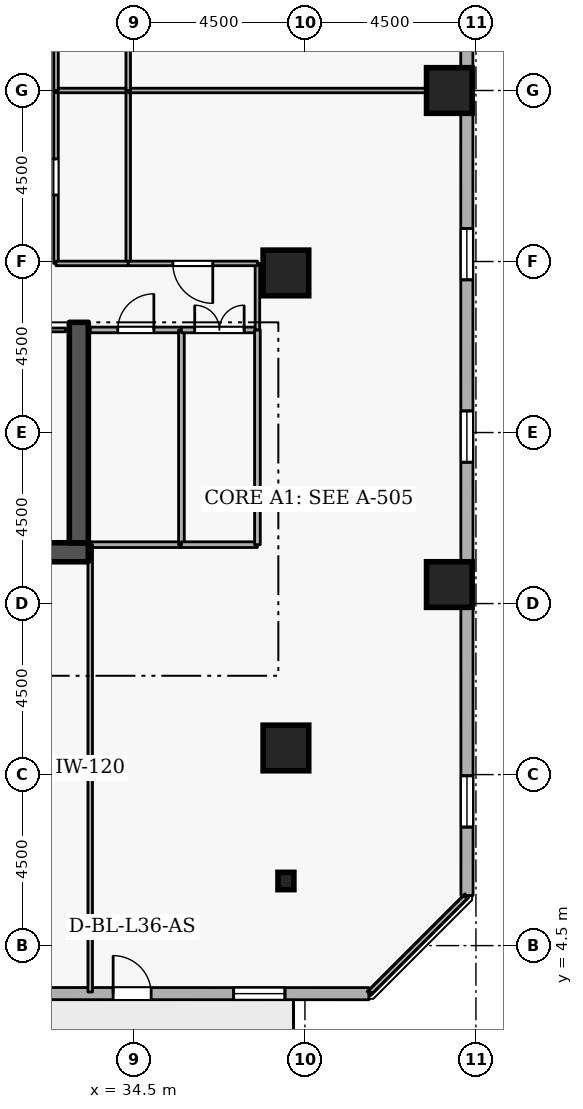
"""IFC4 building model, lengths in metres.
Left out: names, types, materials, properties, quantities, classifications, styles, units other than length and angle.
Written with IfcOpenShell. Run it as: python <this file> out.ifc"""

import sys

from ifc_helpers import new_model, si_unit, direction, frame, frame_2d, origin, origin_2d, place, context, subcontext, project, spatial, rectangle, i_section, extrude, element, fill, save


model = new_model("IFC4")
c1 = context("Model", 3, precision=1e-05, world=origin(), true_north=direction((0.0, 1.0)))
c2 = subcontext(c1, "Body", "Model", "MODEL_VIEW")
j1 = project(units=[si_unit("LENGTHUNIT", "METRE"), si_unit("PLANEANGLEUNIT", "RADIAN")], contexts=[c1])
p1 = place(None, origin())
s1 = spatial("IfcSite", under=j1, at=p1, CompositionType="ELEMENT")
p2 = place(p1, origin())
s2 = spatial("IfcBuilding", under=s1, at=p2, CompositionType="ELEMENT")
p3 = place(p2, frame((0.0, 0.0, 137.7)))
s3 = spatial("IfcBuildingStorey", under=s2, at=p3, CompositionType="ELEMENT", Elevation=137.7)
p4 = place(p3, frame((17.7, 14.85, 0.0), z_axis=(0.0, 0.0, 1.0), x_axis=(1.0, 0.0, 0.0)))
e1 = element("IfcWall", 1, at=p4, inside=s3, PredefinedType="SHEAR", context=c2, shape_type="SweptSolid", body=[
    extrude(rectangle(XDim=15.6, YDim=0.5, at=frame_2d((7.8, 0.0))), origin(), (0.0, 0.0, 1.0), 3.6),
])
p5 = place(p3, frame((33.05, 15.1, 0.0), z_axis=(0.0, 0.0, 1.0), x_axis=(0.0, 1.0, 0.0)))
e2 = element("IfcWall", 2, at=p5, inside=s3, PredefinedType="SHEAR", context=c2, shape_type="SweptSolid", body=[
    extrude(rectangle(XDim=5.8, YDim=0.5, at=frame_2d((2.9, 0.0))), origin(), (0.0, 0.0, 1.0), 3.6),
])
for number, where, z_axis, x_axis in (
    (3, (38.5, 9.7, 0.0), (0.0, 0.0, 1.0), (1.0, 0.0, 0.0)),
    (4, (42.8, 14.0, 0.0), (0.0, 0.0, 1.0), (1.0, 0.0, 0.0)),
    (5, (42.8, 27.0, 0.0), (0.0, 0.0, 1.0), (1.0, 0.0, 0.0)),
    (6, (38.5, 22.2, 0.0), (0.0, 0.0, 1.0), (1.0, 0.0, 0.0)),
):
    element("IfcColumn", number, at=place(p3, frame(where, z_axis=z_axis, x_axis=x_axis)), inside=s3, PredefinedType="COLUMN", context=c2, shape_type="SweptSolid", body=[
        extrude(rectangle(XDim=1.2, YDim=1.2, at=origin_2d()), origin(), (0.0, 0.0, 1.0), 3.6),
    ])
p6 = place(p3, frame((38.5, 6.2, 0.0), z_axis=(0.0, 0.0, 1.0), x_axis=(1.0, 0.0, 0.0)))
e7 = element("IfcColumn", 7, at=p6, inside=s3, PredefinedType="COLUMN", context=c2, shape_type="SweptSolid", body=[
    extrude(i_section(OverallWidth=0.418, OverallDepth=0.456, WebThickness=0.042, FlangeThickness=0.067, FilletRadius=0.015, at=origin_2d()), origin(), (0.0, 0.0, 1.0), 3.6),
])
p7 = place(p3, frame((6.525, 3.243, 0.0), z_axis=(0.0, 0.0, 1.0), x_axis=(0.99999997701, -0.000214431216, 0.0)))
e8 = element("IfcWall", 8, at=p7, inside=s3, PredefinedType="STANDARD", context=c2, shape_type="SweptSolid", body=[
    extrude(rectangle(XDim=34.156, YDim=0.32, at=frame_2d((17.078, 0.0))), origin(), (0.0, 0.0, 1.0), 2.66),
])
p8 = place(p7, frame((27.428, 0.0, 0.0)))
e9 = element("IfcOpeningElement", 9, at=p8, cuts=e8, PredefinedType="OPENING", context=c2, shape_type="SweptSolid", body=[
    extrude(rectangle(XDim=1.0, YDim=2.08, at=frame_2d((0.5, 1.04))), frame((0.0, 0.17, 0.0), z_axis=(0.0, -1.0, 0.0), x_axis=(1.0, 0.0, 0.0)), (0.0, 0.0, 1.0), 0.34),
])
p9 = place(p7, frame((1.8, 0.0, 0.72)))
e10 = element("IfcOpeningElement", 10, at=p9, cuts=e8, PredefinedType="OPENING", context=c2, shape_type="SweptSolid", body=[
    extrude(rectangle(XDim=1.35, YDim=1.05, at=frame_2d((0.675, 0.525))), frame((0.0, 0.17, 0.0), z_axis=(0.0, -1.0, 0.0), x_axis=(1.0, 0.0, 0.0)), (0.0, 0.0, 1.0), 0.34),
])
p10 = place(p7, frame((6.6, 0.0, 0.72)))
e11 = element("IfcOpeningElement", 11, at=p10, cuts=e8, PredefinedType="OPENING", context=c2, shape_type="SweptSolid", body=[
    extrude(rectangle(XDim=1.35, YDim=1.05, at=frame_2d((0.675, 0.525))), frame((0.0, 0.17, 0.0), z_axis=(0.0, -1.0, 0.0), x_axis=(1.0, 0.0, 0.0)), (0.0, 0.0, 1.0), 0.34),
])
p11 = place(p7, frame((11.4, 0.0, 0.72)))
e12 = element("IfcOpeningElement", 12, at=p11, cuts=e8, PredefinedType="OPENING", context=c2, shape_type="SweptSolid", body=[
    extrude(rectangle(XDim=1.35, YDim=1.05, at=frame_2d((0.675, 0.525))), frame((0.0, 0.17, 0.0), z_axis=(0.0, -1.0, 0.0), x_axis=(1.0, 0.0, 0.0)), (0.0, 0.0, 1.0), 0.34),
])
p12 = place(p7, frame((16.2, 0.0, 0.72)))
e13 = element("IfcOpeningElement", 13, at=p12, cuts=e8, PredefinedType="OPENING", context=c2, shape_type="SweptSolid", body=[
    extrude(rectangle(XDim=1.35, YDim=1.05, at=frame_2d((0.675, 0.525))), frame((0.0, 0.17, 0.0), z_axis=(0.0, -1.0, 0.0), x_axis=(1.0, 0.0, 0.0)), (0.0, 0.0, 1.0), 0.34),
])
p13 = place(p7, frame((21.0, 0.0, 0.72)))
e14 = element("IfcOpeningElement", 14, at=p13, cuts=e8, PredefinedType="OPENING", context=c2, shape_type="SweptSolid", body=[
    extrude(rectangle(XDim=1.35, YDim=1.05, at=frame_2d((0.675, 0.525))), frame((0.0, 0.17, 0.0), z_axis=(0.0, -1.0, 0.0), x_axis=(1.0, 0.0, 0.0)), (0.0, 0.0, 1.0), 0.34),
])
p14 = place(p7, frame((30.6, 0.0, 0.72)))
e15 = element("IfcOpeningElement", 15, at=p14, cuts=e8, PredefinedType="OPENING", context=c2, shape_type="SweptSolid", body=[
    extrude(rectangle(XDim=1.35, YDim=1.05, at=frame_2d((0.675, 0.525))), frame((0.0, 0.17, 0.0), z_axis=(0.0, -1.0, 0.0), x_axis=(1.0, 0.0, 0.0)), (0.0, 0.0, 1.0), 0.34),
])
p15 = place(p3, frame((43.265, 5.819, 0.0), z_axis=(0.0, 0.0, 1.0), x_axis=(-0.000214431216, 0.99999997701, 0.0)))
e16 = element("IfcWall", 16, at=p15, inside=s3, PredefinedType="STANDARD", context=c2, shape_type="SweptSolid", body=[
    extrude(rectangle(XDim=34.156, YDim=0.32, at=frame_2d((17.078, 0.0))), origin(), (0.0, 0.0, 1.0), 2.66),
])
p16 = place(p15, frame((1.8, 0.0, 0.72)))
e17 = element("IfcOpeningElement", 17, at=p16, cuts=e16, PredefinedType="OPENING", context=c2, shape_type="SweptSolid", body=[
    extrude(rectangle(XDim=1.35, YDim=1.05, at=frame_2d((0.675, 0.525))), frame((0.0, 0.17, 0.0), z_axis=(0.0, -1.0, 0.0), x_axis=(1.0, 0.0, 0.0)), (0.0, 0.0, 1.0), 0.34),
])
p17 = place(p15, frame((11.4, 0.0, 0.72)))
e18 = element("IfcOpeningElement", 18, at=p17, cuts=e16, PredefinedType="OPENING", context=c2, shape_type="SweptSolid", body=[
    extrude(rectangle(XDim=1.35, YDim=1.05, at=frame_2d((0.675, 0.525))), frame((0.0, 0.17, 0.0), z_axis=(0.0, -1.0, 0.0), x_axis=(1.0, 0.0, 0.0)), (0.0, 0.0, 1.0), 0.34),
])
p18 = place(p15, frame((16.2, 0.0, 0.72)))
e19 = element("IfcOpeningElement", 19, at=p18, cuts=e16, PredefinedType="OPENING", context=c2, shape_type="SweptSolid", body=[
    extrude(rectangle(XDim=1.35, YDim=1.05, at=frame_2d((0.675, 0.525))), frame((0.0, 0.17, 0.0), z_axis=(0.0, -1.0, 0.0), x_axis=(1.0, 0.0, 0.0)), (0.0, 0.0, 1.0), 0.34),
])
p19 = place(p15, frame((25.8, 0.0, 0.72)))
e20 = element("IfcOpeningElement", 20, at=p19, cuts=e16, PredefinedType="OPENING", context=c2, shape_type="SweptSolid", body=[
    extrude(rectangle(XDim=1.35, YDim=1.05, at=frame_2d((0.675, 0.525))), frame((0.0, 0.17, 0.0), z_axis=(0.0, -1.0, 0.0), x_axis=(1.0, 0.0, 0.0)), (0.0, 0.0, 1.0), 0.34),
])
p20 = place(p15, frame((30.6, 0.0, 0.72)))
e21 = element("IfcOpeningElement", 21, at=p20, cuts=e16, PredefinedType="OPENING", context=c2, shape_type="SweptSolid", body=[
    extrude(rectangle(XDim=1.35, YDim=1.05, at=frame_2d((0.675, 0.525))), frame((0.0, 0.17, 0.0), z_axis=(0.0, -1.0, 0.0), x_axis=(1.0, 0.0, 0.0)), (0.0, 0.0, 1.0), 0.34),
])
p21 = place(p3, frame((30.55, 20.7, 0.0), z_axis=(0.0, 0.0, 1.0), x_axis=(1.0, 0.0, 0.0)))
e22 = element("IfcWall", 22, at=p21, inside=s3, PredefinedType="PARTITIONING", context=c2, shape_type="SweptSolid", body=[
    extrude(rectangle(XDim=2.15, YDim=0.1, at=frame_2d((1.075, 0.0))), origin(), (0.0, 0.0, 1.0), 3.26),
])
p22 = place(p21, frame((0.6, 0.0, 0.0)))
e23 = element("IfcOpeningElement", 23, at=p22, cuts=e22, PredefinedType="OPENING", context=c2, shape_type="SweptSolid", body=[
    extrude(rectangle(XDim=0.95, YDim=2.1, at=frame_2d((0.475, 1.05))), frame((0.0, 0.06, 0.0), z_axis=(0.0, -1.0, 0.0), x_axis=(1.0, 0.0, 0.0)), (0.0, 0.0, 1.0), 0.12),
])
p23 = place(p3, frame((35.75, 15.05, 0.0), z_axis=(0.0, 0.0, 1.0), x_axis=(-1.0, 0.0, 0.0)))
e24 = element("IfcWall", 24, at=p23, inside=s3, PredefinedType="PARTITIONING", context=c2, shape_type="SweptSolid", body=[
    extrude(rectangle(XDim=2.4, YDim=0.15, at=frame_2d((1.2, 0.0))), origin(), (0.0, 0.0, 1.0), 3.26),
])
p24 = place(p3, frame((33.35, 20.7, 0.0), z_axis=(0.0, 0.0, 1.0), x_axis=(1.0, 0.0, 0.0)))
e25 = element("IfcWall", 25, at=p24, inside=s3, PredefinedType="PARTITIONING", context=c2, shape_type="SweptSolid", body=[
    extrude(rectangle(XDim=2.4, YDim=0.15, at=frame_2d((1.2, 0.0))), origin(), (0.0, 0.0, 1.0), 3.26),
])
p25 = place(p24, frame((0.725, 0.0, 0.0)))
e26 = element("IfcOpeningElement", 26, at=p25, cuts=e25, PredefinedType="OPENING", context=c2, shape_type="SweptSolid", body=[
    extrude(rectangle(XDim=0.95, YDim=2.1, at=frame_2d((0.475, 1.05))), frame((0.0, 0.085, 0.0), z_axis=(0.0, -1.0, 0.0), x_axis=(1.0, 0.0, 0.0)), (0.0, 0.0, 1.0), 0.17),
])
p26 = place(p3, frame((35.75, 20.7, 0.0), z_axis=(0.0, 0.0, 1.0), x_axis=(0.0, -1.0, 0.0)))
e27 = element("IfcWall", 27, at=p26, inside=s3, PredefinedType="PARTITIONING", context=c2, shape_type="SweptSolid", body=[
    extrude(rectangle(XDim=5.65, YDim=0.15, at=frame_2d((2.825, 0.0))), origin(), (0.0, 0.0, 1.0), 3.26),
])
p27 = place(p3, frame((37.75, 15.05, 0.0), z_axis=(0.0, 0.0, 1.0), x_axis=(-1.0, 0.0, 0.0)))
e28 = element("IfcWall", 28, at=p27, inside=s3, PredefinedType="PARTITIONING", context=c2, shape_type="SweptSolid", body=[
    extrude(rectangle(XDim=2.0, YDim=0.15, at=frame_2d((1.0, 0.0))), origin(), (0.0, 0.0, 1.0), 3.26),
])
p28 = place(p3, frame((35.75, 20.7, 0.0), z_axis=(0.0, 0.0, 1.0), x_axis=(1.0, 0.0, 0.0)))
e29 = element("IfcWall", 29, at=p28, inside=s3, PredefinedType="PARTITIONING", context=c2, shape_type="SweptSolid", body=[
    extrude(rectangle(XDim=2.0, YDim=0.15, at=frame_2d((1.0, 0.0))), origin(), (0.0, 0.0, 1.0), 3.26),
])
p29 = place(p28, frame((0.35, 0.0, 0.0)))
e30 = element("IfcOpeningElement", 30, at=p29, cuts=e29, PredefinedType="OPENING", context=c2, shape_type="SweptSolid", body=[
    extrude(rectangle(XDim=1.3, YDim=2.12, at=frame_2d((0.65, 1.06))), frame((0.0, 0.085, 0.0), z_axis=(0.0, -1.0, 0.0), x_axis=(1.0, 0.0, 0.0)), (0.0, 0.0, 1.0), 0.17),
])
p30 = place(p3, frame((37.75, 20.7, 0.0), z_axis=(0.0, 0.0, 1.0), x_axis=(0.0, -1.0, 0.0)))
e31 = element("IfcWall", 31, at=p30, inside=s3, PredefinedType="PARTITIONING", context=c2, shape_type="SweptSolid", body=[
    extrude(rectangle(XDim=5.65, YDim=0.15, at=frame_2d((2.825, 0.0))), origin(), (0.0, 0.0, 1.0), 3.26),
])
p31 = place(p3, frame((32.45, 22.45, 0.0), z_axis=(0.0, 0.0, 1.0), x_axis=(0.0, 1.0, 0.0)))
e32 = element("IfcWall", 32, at=p31, inside=s3, PredefinedType="PARTITIONING", context=c2, shape_type="SweptSolid", body=[
    extrude(rectangle(XDim=4.55, YDim=0.12, at=frame_2d((2.275, 0.0))), origin(), (0.0, 0.0, 1.0), 3.26),
])
p32 = place(p31, frame((1.8, 0.0, 0.0)))
e33 = element("IfcOpeningElement", 33, at=p32, cuts=e32, PredefinedType="OPENING", context=c2, shape_type="SweptSolid", body=[
    extrude(rectangle(XDim=0.95, YDim=2.1, at=frame_2d((0.475, 1.05))), frame((0.0, 0.07, 0.0), z_axis=(0.0, -1.0, 0.0), x_axis=(1.0, 0.0, 0.0)), (0.0, 0.0, 1.0), 0.14),
])
p33 = place(p3, frame((32.45, 27.0, 0.0), z_axis=(0.0, 0.0, 1.0), x_axis=(1.0, 0.0, 0.0)))
e34 = element("IfcWall", 34, at=p33, inside=s3, PredefinedType="PARTITIONING", context=c2, shape_type="SweptSolid", body=[
    extrude(rectangle(XDim=1.9, YDim=0.12, at=frame_2d((0.95, 0.0))), origin(), (0.0, 0.0, 1.0), 2.802),
])
p34 = place(p3, frame((34.35, 27.0, 0.0), z_axis=(0.0, 0.0, 1.0), x_axis=(0.0, -1.0, 0.0)))
e35 = element("IfcWall", 35, at=p34, inside=s3, PredefinedType="PARTITIONING", context=c2, shape_type="SweptSolid", body=[
    extrude(rectangle(XDim=4.55, YDim=0.12, at=frame_2d((2.275, 0.0))), origin(), (0.0, 0.0, 1.0), 3.26),
])
p35 = place(p3, frame((34.35, 22.45, 0.0), z_axis=(0.0, 0.0, 1.0), x_axis=(-1.0, 0.0, 0.0)))
e36 = element("IfcWall", 36, at=p35, inside=s3, PredefinedType="PARTITIONING", context=c2, shape_type="SweptSolid", body=[
    extrude(rectangle(XDim=1.9, YDim=0.12, at=frame_2d((0.95, 0.0))), origin(), (0.0, 0.0, 1.0), 3.26),
])
p36 = place(p3, frame((33.35, 3.28, 0.0), z_axis=(0.0, 0.0, 1.0), x_axis=(0.0, 1.0, 0.0)))
e37 = element("IfcWall", 37, at=p36, inside=s3, PredefinedType="PARTITIONING", context=c2, shape_type="SweptSolid", body=[
    extrude(rectangle(XDim=11.77, YDim=0.12, at=frame_2d((5.885, 0.0))), origin(), (0.0, 0.0, 1.0), 2.465),
])
p37 = place(p3, frame((37.75, 20.7, 0.0), z_axis=(0.0, 0.0, 1.0), x_axis=(0.0, 1.0, 0.0)))
e38 = element("IfcWall", 38, at=p37, inside=s3, PredefinedType="PARTITIONING", context=c2, shape_type="SweptSolid", body=[
    extrude(rectangle(XDim=1.75, YDim=0.12, at=frame_2d((0.875, 0.0))), origin(), (0.0, 0.0, 1.0), 3.26),
])
p38 = place(p3, frame((37.75, 22.45, 0.0), z_axis=(0.0, 0.0, 1.0), x_axis=(-1.0, 0.0, 0.0)))
e39 = element("IfcWall", 39, at=p38, inside=s3, PredefinedType="PARTITIONING", context=c2, shape_type="SweptSolid", body=[
    extrude(rectangle(XDim=3.4, YDim=0.12, at=frame_2d((1.7, 0.0))), origin(), (0.0, 0.0, 1.0), 3.26),
])
p39 = place(p38, frame((1.175, 0.0, 0.0)))
e40 = element("IfcOpeningElement", 40, at=p39, cuts=e39, PredefinedType="OPENING", context=c2, shape_type="SweptSolid", body=[
    extrude(rectangle(XDim=1.05, YDim=2.1, at=frame_2d((0.525, 1.05))), frame((0.0, 0.07, 0.0), z_axis=(0.0, -1.0, 0.0), x_axis=(1.0, 0.0, 0.0)), (0.0, 0.0, 1.0), 0.14),
])
p40 = place(p3, frame((34.35, 27.0, 0.0), z_axis=(0.0, 0.0, 1.0), x_axis=(1.0, 0.0, 0.0)))
e41 = element("IfcWall", 41, at=p40, inside=s3, PredefinedType="PARTITIONING", context=c2, shape_type="SweptSolid", body=[
    extrude(rectangle(XDim=8.87, YDim=0.12, at=frame_2d((4.435, 0.0))), origin(), (0.0, 0.0, 1.0), 2.802),
])
p41 = place(p3, frame((43.22, 5.775, 0.0), z_axis=(0.0, 0.0, 1.0), x_axis=(-0.707106781187, -0.707106781187, 0.0)))
e42 = element("IfcWall", 42, at=p41, inside=s3, PredefinedType="PARTITIONING", context=c2, shape_type="SweptSolid", body=[
    extrude(rectangle(XDim=3.528, YDim=0.12, at=frame_2d((1.764, 0.0))), origin(), (0.0, 0.0, 1.0), 3.26),
])
p42 = place(p3, frame((32.45, 27.0, 0.0), z_axis=(0.0, 0.0, 1.0), x_axis=(0.0, 1.0, 0.0)))
e43 = element("IfcWall", 43, at=p42, inside=s3, PredefinedType="PARTITIONING", context=c2, shape_type="SweptSolid", body=[
    extrude(rectangle(XDim=4.55, YDim=0.12, at=frame_2d((2.275, 0.0))), origin(), (0.0, 0.0, 1.0), 3.26),
])
p43 = place(p42, frame((1.8, 0.0, 0.0)))
e44 = element("IfcOpeningElement", 44, at=p43, cuts=e43, PredefinedType="OPENING", context=c2, shape_type="SweptSolid", body=[
    extrude(rectangle(XDim=0.95, YDim=2.1, at=frame_2d((0.475, 1.05))), frame((0.0, 0.07, 0.0), z_axis=(0.0, -1.0, 0.0), x_axis=(1.0, 0.0, 0.0)), (0.0, 0.0, 1.0), 0.14),
])
p44 = place(p3, frame((34.35, 31.55, 0.0), z_axis=(0.0, 0.0, 1.0), x_axis=(0.0, -1.0, 0.0)))
e45 = element("IfcWall", 45, at=p44, inside=s3, PredefinedType="PARTITIONING", context=c2, shape_type="SweptSolid", body=[
    extrude(rectangle(XDim=4.55, YDim=0.12, at=frame_2d((2.275, 0.0))), origin(), (0.0, 0.0, 1.0), 3.26),
])
p45 = place(p8, origin())
e46 = element("IfcDoor", 46, at=p45, inside=s3, OperationType="SINGLE_SWING_LEFT", PredefinedType="DOOR", context=c2, shape_type="SweptSolid", body=[
    extrude(rectangle(XDim=1.0, YDim=2.08, at=frame_2d((0.5, 1.04))), frame((0.0, 0.025, 0.0), z_axis=(0.0, -1.0, 0.0), x_axis=(1.0, 0.0, 0.0)), (0.0, 0.0, 1.0), 0.05),
])
fill(e9, e46)
p46 = place(p14, origin())
e47 = element("IfcWindow", 47, at=p46, inside=s3, PartitioningType="SINGLE_PANEL", PredefinedType="WINDOW", context=c2, shape_type="SweptSolid", body=[
    extrude(rectangle(XDim=1.35, YDim=1.05, at=frame_2d((0.675, 0.525))), frame((0.0, 0.03, 0.0), z_axis=(0.0, -1.0, 0.0), x_axis=(1.0, 0.0, 0.0)), (0.0, 0.0, 1.0), 0.06),
])
fill(e15, e47)
p47 = place(p16, origin())
e48 = element("IfcWindow", 48, at=p47, inside=s3, PartitioningType="SINGLE_PANEL", PredefinedType="WINDOW", context=c2, shape_type="SweptSolid", body=[
    extrude(rectangle(XDim=1.35, YDim=1.05, at=frame_2d((0.675, 0.525))), frame((0.0, 0.03, 0.0), z_axis=(0.0, -1.0, 0.0), x_axis=(1.0, 0.0, 0.0)), (0.0, 0.0, 1.0), 0.06),
])
fill(e17, e48)
p48 = place(p17, origin())
e49 = element("IfcWindow", 49, at=p48, inside=s3, PartitioningType="SINGLE_PANEL", PredefinedType="WINDOW", context=c2, shape_type="SweptSolid", body=[
    extrude(rectangle(XDim=1.35, YDim=1.05, at=frame_2d((0.675, 0.525))), frame((0.0, 0.03, 0.0), z_axis=(0.0, -1.0, 0.0), x_axis=(1.0, 0.0, 0.0)), (0.0, 0.0, 1.0), 0.06),
])
fill(e18, e49)
p49 = place(p18, origin())
e50 = element("IfcWindow", 50, at=p49, inside=s3, PartitioningType="SINGLE_PANEL", PredefinedType="WINDOW", context=c2, shape_type="SweptSolid", body=[
    extrude(rectangle(XDim=1.35, YDim=1.05, at=frame_2d((0.675, 0.525))), frame((0.0, 0.03, 0.0), z_axis=(0.0, -1.0, 0.0), x_axis=(1.0, 0.0, 0.0)), (0.0, 0.0, 1.0), 0.06),
])
fill(e19, e50)
p50 = place(p25, origin())
e51 = element("IfcDoor", 51, at=p50, inside=s3, OperationType="SINGLE_SWING_RIGHT", PredefinedType="DOOR", context=c2, shape_type="SweptSolid", body=[
    extrude(rectangle(XDim=0.95, YDim=2.1, at=frame_2d((0.475, 1.05))), frame((0.0, 0.025, 0.0), z_axis=(0.0, -1.0, 0.0), x_axis=(1.0, 0.0, 0.0)), (0.0, 0.0, 1.0), 0.05),
])
fill(e26, e51)
p51 = place(p29, origin())
e52 = element("IfcDoor", 52, at=p51, inside=s3, OperationType="DOUBLE_DOOR_SINGLE_SWING", PredefinedType="DOOR", context=c2, shape_type="SweptSolid", body=[
    extrude(rectangle(XDim=1.3, YDim=2.12, at=frame_2d((0.65, 1.06))), frame((0.0, 0.025, 0.0), z_axis=(0.0, -1.0, 0.0), x_axis=(1.0, 0.0, 0.0)), (0.0, 0.0, 1.0), 0.05),
])
fill(e30, e52)
p52 = place(p32, origin())
e53 = element("IfcDoor", 53, at=p52, inside=s3, OperationType="SINGLE_SWING_RIGHT", PredefinedType="DOOR", context=c2, shape_type="SweptSolid", body=[
    extrude(rectangle(XDim=0.95, YDim=2.1, at=frame_2d((0.475, 1.05))), frame((0.0, 0.025, 0.0), z_axis=(0.0, -1.0, 0.0), x_axis=(1.0, 0.0, 0.0)), (0.0, 0.0, 1.0), 0.05),
])
fill(e33, e53)
p53 = place(p39, origin())
e54 = element("IfcDoor", 54, at=p53, inside=s3, OperationType="SINGLE_SWING_LEFT", PredefinedType="DOOR", context=c2, shape_type="SweptSolid", body=[
    extrude(rectangle(XDim=1.05, YDim=2.1, at=frame_2d((0.525, 1.05))), frame((0.0, 0.025, 0.0), z_axis=(0.0, -1.0, 0.0), x_axis=(1.0, 0.0, 0.0)), (0.0, 0.0, 1.0), 0.05),
])
fill(e40, e54)
save(model, sys.argv[1])
